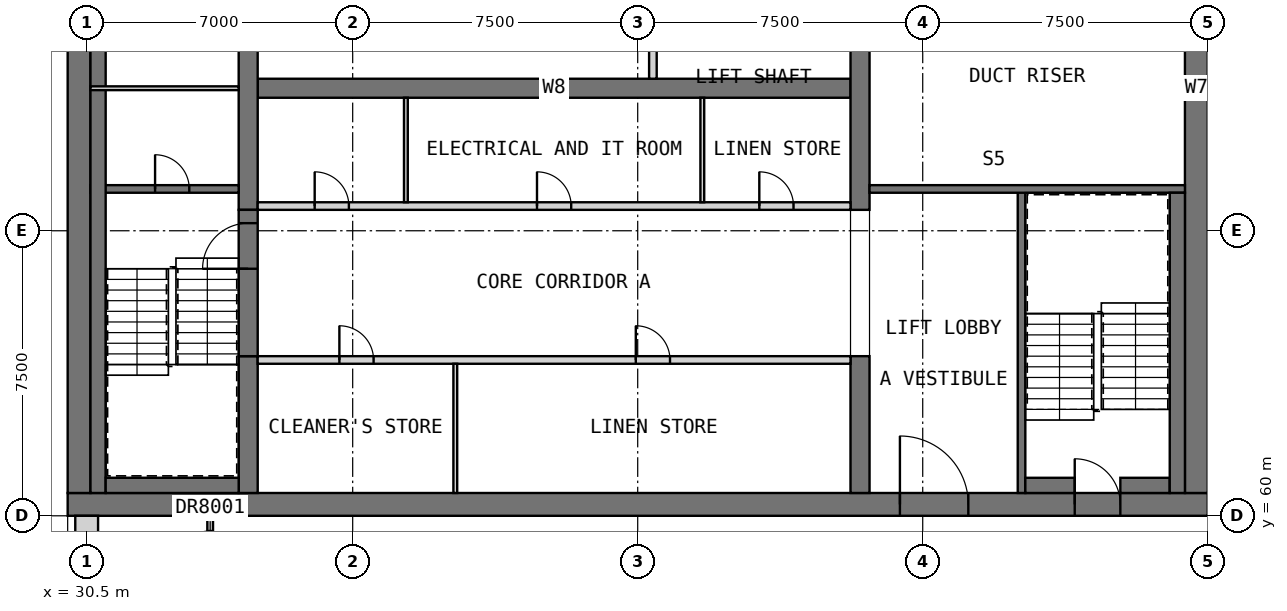
"""IFC4 building model, lengths in metres.
Left out: names, types, materials, properties, quantities, classifications, styles, units other than length and angle.
Written with IfcOpenShell. Run it as: python <this file> out.ifc"""

import sys

from ifc_helpers import new_model, si_unit, direction, frame, frame_2d, origin, place, context, subcontext, project, spatial, rectangle, extrude, element, fill, save


model = new_model("IFC4")
c1 = context("Model", 3, precision=1e-05, world=origin(), true_north=direction((0.0, 1.0)))
c2 = subcontext(c1, "Body", "Model", "MODEL_VIEW")
j1 = project(units=[si_unit("LENGTHUNIT", "METRE"), si_unit("PLANEANGLEUNIT", "RADIAN")], contexts=[c1])
p1 = place(None, origin())
s1 = spatial("IfcSite", under=j1, at=p1, CompositionType="ELEMENT")
p2 = place(p1, origin())
s2 = spatial("IfcBuilding", under=s1, at=p2, CompositionType="ELEMENT")
p3 = place(p2, frame((0.0, 0.0, 233.7)))
s3 = spatial("IfcBuildingStorey", under=s2, at=p3, CompositionType="ELEMENT", Elevation=233.7)
p4 = place(p3, frame((30.0, 60.3, 0.0), z_axis=(0.0, 0.0, 1.0), x_axis=(1.0, 0.0, 0.0)))
e1 = element("IfcWall", 1, at=p4, inside=s3, PredefinedType="SHEAR", context=c2, shape_type="SweptSolid", body=[
    extrude(rectangle(XDim=30.0, YDim=0.6, at=frame_2d((15.0, 0.0))), origin(), (0.0, 0.0, 1.0), 3.5),
])
p5 = place(p4, frame((21.9, 0.0, 0.0)))
e2 = element("IfcOpeningElement", 2, at=p5, cuts=e1, PredefinedType="OPENING", context=c2, shape_type="SweptSolid", body=[
    extrude(rectangle(XDim=1.8, YDim=2.1, at=frame_2d((0.9, 1.05))), frame((0.0, 0.31, 0.0), z_axis=(0.0, -1.0, 0.0), x_axis=(1.0, 0.0, 0.0)), (0.0, 0.0, 1.0), 0.62),
])
p6 = place(p4, frame((26.5, 0.0, 0.0)))
e3 = element("IfcOpeningElement", 3, at=p6, cuts=e1, PredefinedType="OPENING", context=c2, shape_type="SweptSolid", body=[
    extrude(rectangle(XDim=1.2, YDim=2.1, at=frame_2d((0.6, 1.05))), frame((0.0, 0.31, 0.0), z_axis=(0.0, -1.0, 0.0), x_axis=(1.0, 0.0, 0.0)), (0.0, 0.0, 1.0), 0.62),
])
p7 = place(p3, frame((30.3, 60.6, 0.0), z_axis=(0.0, 0.0, 1.0), x_axis=(0.0, 1.0, 0.0)))
e4 = element("IfcWall", 4, at=p7, inside=s3, PredefinedType="SHEAR", context=c2, shape_type="SweptSolid", body=[
    extrude(rectangle(XDim=21.3, YDim=0.6, at=frame_2d((10.65, 0.0))), origin(), (0.0, 0.0, 1.0), 3.5),
])
p8 = place(p3, frame((59.7, 60.6, 0.0), z_axis=(0.0, 0.0, 1.0), x_axis=(0.0, 1.0, 0.0)))
e5 = element("IfcWall", 5, at=p8, inside=s3, PredefinedType="SHEAR", context=c2, shape_type="SweptSolid", body=[
    extrude(rectangle(XDim=21.3, YDim=0.6, at=frame_2d((10.65, 0.0))), origin(), (0.0, 0.0, 1.0), 3.5),
])
p9 = place(p8, frame((14.9, 0.0, 0.0)))
e6 = element("IfcOpeningElement", 6, at=p9, cuts=e5, PredefinedType="OPENING", context=c2, shape_type="SweptSolid", body=[
    extrude(rectangle(XDim=1.8, YDim=2.1, at=frame_2d((0.9, 1.05))), frame((0.0, 0.31, 0.0), z_axis=(0.0, -1.0, 0.0), x_axis=(1.0, 0.0, 0.0)), (0.0, 0.0, 1.0), 0.62),
])
p10 = place(p3, frame((35.0, 71.25, 0.0), z_axis=(0.0, 0.0, 1.0), x_axis=(1.0, 0.0, 0.0)))
e7 = element("IfcWall", 7, at=p10, inside=s3, PredefinedType="SHEAR", context=c2, shape_type="SweptSolid", body=[
    extrude(rectangle(XDim=15.6, YDim=0.5, at=frame_2d((7.8, 0.0))), origin(), (0.0, 0.0, 1.0), 3.5),
])
p11 = place(p3, frame((34.75, 60.6, 0.0), z_axis=(0.0, 0.0, 1.0), x_axis=(0.0, 1.0, 0.0)))
e8 = element("IfcWall", 8, at=p11, inside=s3, PredefinedType="SHEAR", context=c2, shape_type="SweptSolid", body=[
    extrude(rectangle(XDim=3.6, YDim=0.5, at=frame_2d((1.8, 0.0))), origin(), (0.0, 0.0, 1.0), 3.5),
])
p12 = place(p3, frame((34.75, 68.05, 0.0), z_axis=(0.0, 0.0, 1.0), x_axis=(0.0, 1.0, 0.0)))
e9 = element("IfcWall", 9, at=p12, inside=s3, PredefinedType="SHEAR", context=c2, shape_type="SweptSolid", body=[
    extrude(rectangle(XDim=6.4, YDim=0.5, at=frame_2d((3.2, 0.0))), origin(), (0.0, 0.0, 1.0), 3.5),
])
p13 = place(p3, frame((50.85, 60.6, 0.0), z_axis=(0.0, 0.0, 1.0), x_axis=(0.0, 1.0, 0.0)))
e10 = element("IfcWall", 10, at=p13, inside=s3, PredefinedType="SHEAR", context=c2, shape_type="SweptSolid", body=[
    extrude(rectangle(XDim=3.6, YDim=0.5, at=frame_2d((1.8, 0.0))), origin(), (0.0, 0.0, 1.0), 3.5),
])
p14 = place(p3, frame((50.85, 68.05, 0.0), z_axis=(0.0, 0.0, 1.0), x_axis=(0.0, 1.0, 0.0)))
e11 = element("IfcWall", 11, at=p14, inside=s3, PredefinedType="SHEAR", context=c2, shape_type="SweptSolid", body=[
    extrude(rectangle(XDim=6.4, YDim=0.5, at=frame_2d((3.2, 0.0))), origin(), (0.0, 0.0, 1.0), 3.5),
])
p15 = place(p2, frame((0.0, 0.0, 34.0)))
s4 = spatial("IfcBuildingStorey", under=s2, at=p15, CompositionType="ELEMENT", Elevation=34.0)
for number, where, z_axis, x_axis in (
    (12, (29.7, 61.05, 0.0), (0.0, 0.0, 1.0), (0.0, 1.0, 0.0)),
    (13, (29.7, 65.925, 0.0), (0.0, 0.0, 1.0), (0.0, 1.0, 0.0)),
    (14, (29.7, 70.8, 0.0), (0.0, 0.0, 1.0), (0.0, 1.0, 0.0)),
):
    element("IfcWall", number, at=place(p15, frame(where, z_axis=z_axis, x_axis=x_axis)), inside=s4, PredefinedType="SOLIDWALL", context=c2, shape_type="SweptSolid", body=[
        extrude(rectangle(XDim=0.9, YDim=0.6, at=frame_2d((0.45, 0.0))), origin(), (0.0, 0.0, 1.0), 286.2),
    ])
p16 = place(p3, frame((30.5, 60.0, 0.0), z_axis=(0.0, 0.0, 1.0), x_axis=(0.0, -1.0, 0.0)))
e15 = element("IfcWall", 15, at=p16, inside=s3, PredefinedType="SOLIDWALL", context=c2, shape_type="SweptSolid", body=[
    extrude(rectangle(XDim=7.0, YDim=0.6, at=frame_2d((3.5, 0.0))), origin(), (0.0, 0.0, 1.0), 3.25),
])
p17 = place(p16, frame((4.175, 0.0, 0.8)))
e16 = element("IfcOpeningElement", 16, at=p17, cuts=e15, PredefinedType="OPENING", context=c2, shape_type="SweptSolid", body=[
    extrude(rectangle(XDim=2.4, YDim=1.8, at=frame_2d((1.2, 0.9))), frame((0.0, 0.31, 0.0), z_axis=(0.0, -1.0, 0.0), x_axis=(1.0, 0.0, 0.0)), (0.0, 0.0, 1.0), 0.62),
])
p18 = place(p16, frame((0.675, 0.0, 0.8)))
e17 = element("IfcOpeningElement", 17, at=p18, cuts=e15, PredefinedType="OPENING", context=c2, shape_type="SweptSolid", body=[
    extrude(rectangle(XDim=2.4, YDim=1.8, at=frame_2d((1.2, 0.9))), frame((0.0, 0.31, 0.0), z_axis=(0.0, -1.0, 0.0), x_axis=(1.0, 0.0, 0.0)), (0.0, 0.0, 1.0), 0.62),
])
p19 = place(p3, frame((35.0, 64.1, 0.0), z_axis=(0.0, 0.0, 1.0), x_axis=(1.0, 0.0, 0.0)))
e18 = element("IfcWall", 18, at=p19, inside=s3, PredefinedType="PARTITIONING", context=c2, shape_type="SweptSolid", body=[
    extrude(rectangle(XDim=15.6, YDim=0.2, at=frame_2d((7.8, 0.0))), origin(), (0.0, 0.0, 1.0), 3.25),
])
p20 = place(p19, frame((2.15, 0.0, 0.0)))
e19 = element("IfcOpeningElement", 19, at=p20, cuts=e18, PredefinedType="OPENING", context=c2, shape_type="SweptSolid", body=[
    extrude(rectangle(XDim=0.9, YDim=2.1, at=frame_2d((0.45, 1.05))), frame((0.0, 0.11, 0.0), z_axis=(0.0, -1.0, 0.0), x_axis=(1.0, 0.0, 0.0)), (0.0, 0.0, 1.0), 0.22),
])
p21 = place(p19, frame((9.95, 0.0, 0.0)))
e20 = element("IfcOpeningElement", 20, at=p21, cuts=e18, PredefinedType="OPENING", context=c2, shape_type="SweptSolid", body=[
    extrude(rectangle(XDim=0.9, YDim=2.1, at=frame_2d((0.45, 1.05))), frame((0.0, 0.11, 0.0), z_axis=(0.0, -1.0, 0.0), x_axis=(1.0, 0.0, 0.0)), (0.0, 0.0, 1.0), 0.22),
])
p22 = place(p3, frame((40.2, 60.6, 0.0), z_axis=(0.0, 0.0, 1.0), x_axis=(0.0, 1.0, 0.0)))
e21 = element("IfcWall", 21, at=p22, inside=s3, PredefinedType="PARTITIONING", context=c2, shape_type="SweptSolid", body=[
    extrude(rectangle(XDim=3.4, YDim=0.1, at=frame_2d((1.7, 0.0))), origin(), (0.0, 0.0, 1.0), 3.25),
])
p23 = place(p3, frame((35.0, 68.15, 0.0), z_axis=(0.0, 0.0, 1.0), x_axis=(1.0, 0.0, 0.0)))
e22 = element("IfcWall", 22, at=p23, inside=s3, PredefinedType="PARTITIONING", context=c2, shape_type="SweptSolid", body=[
    extrude(rectangle(XDim=15.6, YDim=0.2, at=frame_2d((7.8, 0.0))), origin(), (0.0, 0.0, 1.0), 3.25),
])
p24 = place(p23, frame((1.5, 0.0, 0.0)))
e23 = element("IfcOpeningElement", 23, at=p24, cuts=e22, PredefinedType="OPENING", context=c2, shape_type="SweptSolid", body=[
    extrude(rectangle(XDim=0.9, YDim=2.1, at=frame_2d((0.45, 1.05))), frame((0.0, 0.11, 0.0), z_axis=(0.0, -1.0, 0.0), x_axis=(1.0, 0.0, 0.0)), (0.0, 0.0, 1.0), 0.22),
])
p25 = place(p23, frame((7.35, 0.0, 0.0)))
e24 = element("IfcOpeningElement", 24, at=p25, cuts=e22, PredefinedType="OPENING", context=c2, shape_type="SweptSolid", body=[
    extrude(rectangle(XDim=0.9, YDim=2.1, at=frame_2d((0.45, 1.05))), frame((0.0, 0.11, 0.0), z_axis=(0.0, -1.0, 0.0), x_axis=(1.0, 0.0, 0.0)), (0.0, 0.0, 1.0), 0.22),
])
p26 = place(p23, frame((13.2, 0.0, 0.0)))
e25 = element("IfcOpeningElement", 25, at=p26, cuts=e22, PredefinedType="OPENING", context=c2, shape_type="SweptSolid", body=[
    extrude(rectangle(XDim=0.9, YDim=2.1, at=frame_2d((0.45, 1.05))), frame((0.0, 0.11, 0.0), z_axis=(0.0, -1.0, 0.0), x_axis=(1.0, 0.0, 0.0)), (0.0, 0.0, 1.0), 0.22),
])
for number, where, z_axis, x_axis in (
    (26, (38.9, 68.25, 0.0), (0.0, 0.0, 1.0), (0.0, 1.0, 0.0)),
    (27, (46.7, 68.25, 0.0), (0.0, 0.0, 1.0), (0.0, 1.0, 0.0)),
):
    element("IfcWall", number, at=place(p3, frame(where, z_axis=z_axis, x_axis=x_axis)), inside=s3, PredefinedType="PARTITIONING", context=c2, shape_type="SweptSolid", body=[
        extrude(rectangle(XDim=2.75, YDim=0.1, at=frame_2d((1.375, 0.0))), origin(), (0.0, 0.0, 1.0), 3.25),
    ])
p27 = place(p3, frame((45.4, 71.5, 0.0), z_axis=(0.0, 0.0, 1.0), x_axis=(0.0, 1.0, 0.0)))
e28 = element("IfcWall", 28, at=p27, inside=s3, PredefinedType="SOLIDWALL", context=c2, shape_type="SweptSolid", body=[
    extrude(rectangle(XDim=2.0, YDim=0.2, at=frame_2d((1.0, 0.0))), origin(), (0.0, 0.0, 1.0), 3.5),
])
p28 = place(p3, frame((34.75, 64.2, 0.0), z_axis=(0.0, 0.0, 1.0), x_axis=(0.0, 1.0, 0.0)))
e29 = element("IfcWall", 29, at=p28, inside=s3, PredefinedType="SOLIDWALL", context=c2, shape_type="SweptSolid", body=[
    extrude(rectangle(XDim=3.85, YDim=0.5, at=frame_2d((1.925, 0.0))), origin(), (0.0, 0.0, 1.0), 2.3),
])
p29 = place(p28, frame((2.3, 0.0, 0.0)))
e30 = element("IfcOpeningElement", 30, at=p29, cuts=e29, PredefinedType="OPENING", context=c2, shape_type="SweptSolid", body=[
    extrude(rectangle(XDim=1.2, YDim=2.1, at=frame_2d((0.6, 1.05))), frame((0.0, 0.26, 0.0), z_axis=(0.0, -1.0, 0.0), x_axis=(1.0, 0.0, 0.0)), (0.0, 0.0, 1.0), 0.52),
])
p30 = place(p3, frame((30.6, 68.6, 0.0), z_axis=(0.0, 0.0, 1.0), x_axis=(1.0, 0.0, 0.0)))
e31 = element("IfcWall", 31, at=p30, inside=s3, PredefinedType="SOLIDWALL", context=c2, shape_type="SweptSolid", body=[
    extrude(rectangle(XDim=3.9, YDim=0.2, at=frame_2d((1.95, 0.0))), origin(), (0.0, 0.0, 1.0), 3.25),
])
p31 = place(p30, frame((1.7, 0.0, 0.0)))
e32 = element("IfcOpeningElement", 32, at=p31, cuts=e31, PredefinedType="OPENING", context=c2, shape_type="SweptSolid", body=[
    extrude(rectangle(XDim=0.9, YDim=2.1, at=frame_2d((0.45, 1.05))), frame((0.0, 0.11, 0.0), z_axis=(0.0, -1.0, 0.0), x_axis=(1.0, 0.0, 0.0)), (0.0, 0.0, 1.0), 0.22),
])
p32 = place(p3, frame((55.1, 60.6, 0.0), z_axis=(0.0, 0.0, 1.0), x_axis=(0.0, 1.0, 0.0)))
e33 = element("IfcWall", 33, at=p32, inside=s3, PredefinedType="SOLIDWALL", context=c2, shape_type="SweptSolid", body=[
    extrude(rectangle(XDim=8.0, YDim=0.2, at=frame_2d((4.0, 0.0))), origin(), (0.0, 0.0, 1.0), 3.25),
])
p33 = place(p3, frame((51.1, 68.6, 0.0), z_axis=(0.0, 0.0, 1.0), x_axis=(1.0, 0.0, 0.0)))
e34 = element("IfcWall", 34, at=p33, inside=s3, PredefinedType="SOLIDWALL", context=c2, shape_type="SweptSolid", body=[
    extrude(rectangle(XDim=8.3, YDim=0.2, at=frame_2d((4.15, 0.0))), origin(), (0.0, 0.0, 1.0), 3.25),
])
p34 = place(p3, frame((30.8, 60.6, 0.0), z_axis=(0.0, 0.0, 1.0), x_axis=(0.0, 1.0, 0.0)))
e35 = element("IfcWall", 35, at=p34, inside=s3, PredefinedType="SOLIDWALL", context=c2, shape_type="SweptSolid", body=[
    extrude(rectangle(XDim=21.3, YDim=0.4, at=frame_2d((10.65, 0.0))), origin(), (0.0, 0.0, 1.0), 3.25),
])
p35 = place(p3, frame((31.0, 60.8, 0.0), z_axis=(0.0, 0.0, 1.0), x_axis=(1.0, 0.0, 0.0)))
e36 = element("IfcWall", 36, at=p35, inside=s3, PredefinedType="SOLIDWALL", context=c2, shape_type="SweptSolid", body=[
    extrude(rectangle(XDim=3.5, YDim=0.4, at=frame_2d((1.75, 0.0))), origin(), (0.0, 0.0, 1.0), 3.25),
])
for number, where, z_axis, x_axis in (
    (37, (55.2, 60.8, 0.0), (0.0, 0.0, 1.0), (1.0, 0.0, 0.0)),
    (38, (57.7, 60.8, 0.0), (0.0, 0.0, 1.0), (1.0, 0.0, 0.0)),
):
    element("IfcWall", number, at=place(p3, frame(where, z_axis=z_axis, x_axis=x_axis)), inside=s3, PredefinedType="SOLIDWALL", context=c2, shape_type="SweptSolid", body=[
        extrude(rectangle(XDim=1.3, YDim=0.4, at=frame_2d((0.65, 0.0))), origin(), (0.0, 0.0, 1.0), 3.25),
    ])
p36 = place(p3, frame((59.2, 60.6, 0.0), z_axis=(0.0, 0.0, 1.0), x_axis=(0.0, 1.0, 0.0)))
e39 = element("IfcWall", 39, at=p36, inside=s3, PredefinedType="SOLIDWALL", context=c2, shape_type="SweptSolid", body=[
    extrude(rectangle(XDim=7.9, YDim=0.4, at=frame_2d((3.95, 0.0))), origin(), (0.0, 0.0, 1.0), 3.25),
])
p37 = place(p3, frame((30.6, 71.25, 0.0), z_axis=(0.0, 0.0, 1.0), x_axis=(1.0, 0.0, 0.0)))
e40 = element("IfcWall", 40, at=p37, inside=s3, PredefinedType="PARTITIONING", context=c2, shape_type="SweptSolid", body=[
    extrude(rectangle(XDim=3.9, YDim=0.1, at=frame_2d((1.95, 0.0))), origin(), (0.0, 0.0, 1.0), 3.25),
])
p38 = place(p3, frame((33.75, 58.275, 0.0), z_axis=(0.0, 0.0, 1.0), x_axis=(0.0, 1.0, 0.0)))
e41 = element("IfcWall", 41, at=p38, inside=s3, PredefinedType="PARTITIONING", context=c2, shape_type="SweptSolid", body=[
    extrude(rectangle(XDim=1.725, YDim=0.15, at=frame_2d((0.863, 0.0))), origin(), (0.0, 0.0, 1.0), 3.25),
])
p39 = place(p38, frame((0.325, 0.0, 0.0)))
e42 = element("IfcOpeningElement", 42, at=p39, cuts=e41, PredefinedType="OPENING", context=c2, shape_type="SweptSolid", body=[
    extrude(rectangle(XDim=1.0, YDim=2.1, at=frame_2d((0.5, 1.05))), frame((0.0, 0.085, 0.0), z_axis=(0.0, -1.0, 0.0), x_axis=(1.0, 0.0, 0.0)), (0.0, 0.0, 1.0), 0.17),
])
p40 = place(p20, origin())
e43 = element("IfcDoor", 43, at=p40, inside=s3, OperationType="SINGLE_SWING_RIGHT", PredefinedType="DOOR", context=c2, shape_type="SweptSolid", body=[
    extrude(rectangle(XDim=0.9, YDim=2.1, at=frame_2d((0.45, 1.05))), frame((0.0, 0.025, 0.0), z_axis=(0.0, -1.0, 0.0), x_axis=(1.0, 0.0, 0.0)), (0.0, 0.0, 1.0), 0.05),
])
fill(e19, e43)
p41 = place(p21, origin())
e44 = element("IfcDoor", 44, at=p41, inside=s3, OperationType="SINGLE_SWING_LEFT", PredefinedType="DOOR", context=c2, shape_type="SweptSolid", body=[
    extrude(rectangle(XDim=0.9, YDim=2.1, at=frame_2d((0.45, 1.05))), frame((0.0, 0.025, 0.0), z_axis=(0.0, -1.0, 0.0), x_axis=(1.0, 0.0, 0.0)), (0.0, 0.0, 1.0), 0.05),
])
fill(e20, e44)
p42 = place(p24, origin())
e45 = element("IfcDoor", 45, at=p42, inside=s3, OperationType="SINGLE_SWING_RIGHT", PredefinedType="DOOR", context=c2, shape_type="SweptSolid", body=[
    extrude(rectangle(XDim=0.9, YDim=2.1, at=frame_2d((0.45, 1.05))), frame((0.0, 0.025, 0.0), z_axis=(0.0, -1.0, 0.0), x_axis=(1.0, 0.0, 0.0)), (0.0, 0.0, 1.0), 0.05),
])
fill(e23, e45)
p43 = place(p25, origin())
e46 = element("IfcDoor", 46, at=p43, inside=s3, OperationType="SINGLE_SWING_LEFT", PredefinedType="DOOR", context=c2, shape_type="SweptSolid", body=[
    extrude(rectangle(XDim=0.9, YDim=2.1, at=frame_2d((0.45, 1.05))), frame((0.0, 0.025, 0.0), z_axis=(0.0, -1.0, 0.0), x_axis=(1.0, 0.0, 0.0)), (0.0, 0.0, 1.0), 0.05),
])
fill(e24, e46)
p44 = place(p26, origin())
e47 = element("IfcDoor", 47, at=p44, inside=s3, OperationType="SINGLE_SWING_RIGHT", PredefinedType="DOOR", context=c2, shape_type="SweptSolid", body=[
    extrude(rectangle(XDim=0.9, YDim=2.1, at=frame_2d((0.45, 1.05))), frame((0.0, 0.025, 0.0), z_axis=(0.0, -1.0, 0.0), x_axis=(1.0, 0.0, 0.0)), (0.0, 0.0, 1.0), 0.05),
])
fill(e25, e47)
p45 = place(p5, origin())
e48 = element("IfcDoor", 48, at=p45, inside=s3, OperationType="DOUBLE_DOOR_SINGLE_SWING", PredefinedType="DOOR", context=c2, shape_type="SweptSolid", body=[
    extrude(rectangle(XDim=1.8, YDim=2.1, at=frame_2d((0.9, 1.05))), frame((0.0, 0.025, 0.0), z_axis=(0.0, -1.0, 0.0), x_axis=(1.0, 0.0, 0.0)), (0.0, 0.0, 1.0), 0.05),
])
fill(e2, e48)
p46 = place(p29, origin())
e49 = element("IfcDoor", 49, at=p46, inside=s3, OperationType="SINGLE_SWING_LEFT", PredefinedType="DOOR", context=c2, shape_type="SweptSolid", body=[
    extrude(rectangle(XDim=1.2, YDim=2.1, at=frame_2d((0.6, 1.05))), frame((0.0, 0.025, 0.0), z_axis=(0.0, -1.0, 0.0), x_axis=(1.0, 0.0, 0.0)), (0.0, 0.0, 1.0), 0.05),
])
fill(e30, e49)
p47 = place(p31, origin())
e50 = element("IfcDoor", 50, at=p47, inside=s3, OperationType="SINGLE_SWING_LEFT", PredefinedType="DOOR", context=c2, shape_type="SweptSolid", body=[
    extrude(rectangle(XDim=0.9, YDim=2.1, at=frame_2d((0.45, 1.05))), frame((0.0, 0.025, 0.0), z_axis=(0.0, -1.0, 0.0), x_axis=(1.0, 0.0, 0.0)), (0.0, 0.0, 1.0), 0.05),
])
fill(e32, e50)
p48 = place(p6, origin())
e51 = element("IfcDoor", 51, at=p48, inside=s3, OperationType="SINGLE_SWING_LEFT", PredefinedType="DOOR", context=c2, shape_type="SweptSolid", body=[
    extrude(rectangle(XDim=1.2, YDim=2.1, at=frame_2d((0.6, 1.05))), frame((0.0, 0.025, 0.0), z_axis=(0.0, -1.0, 0.0), x_axis=(1.0, 0.0, 0.0)), (0.0, 0.0, 1.0), 0.05),
])
fill(e3, e51)
save(model, sys.argv[1])
